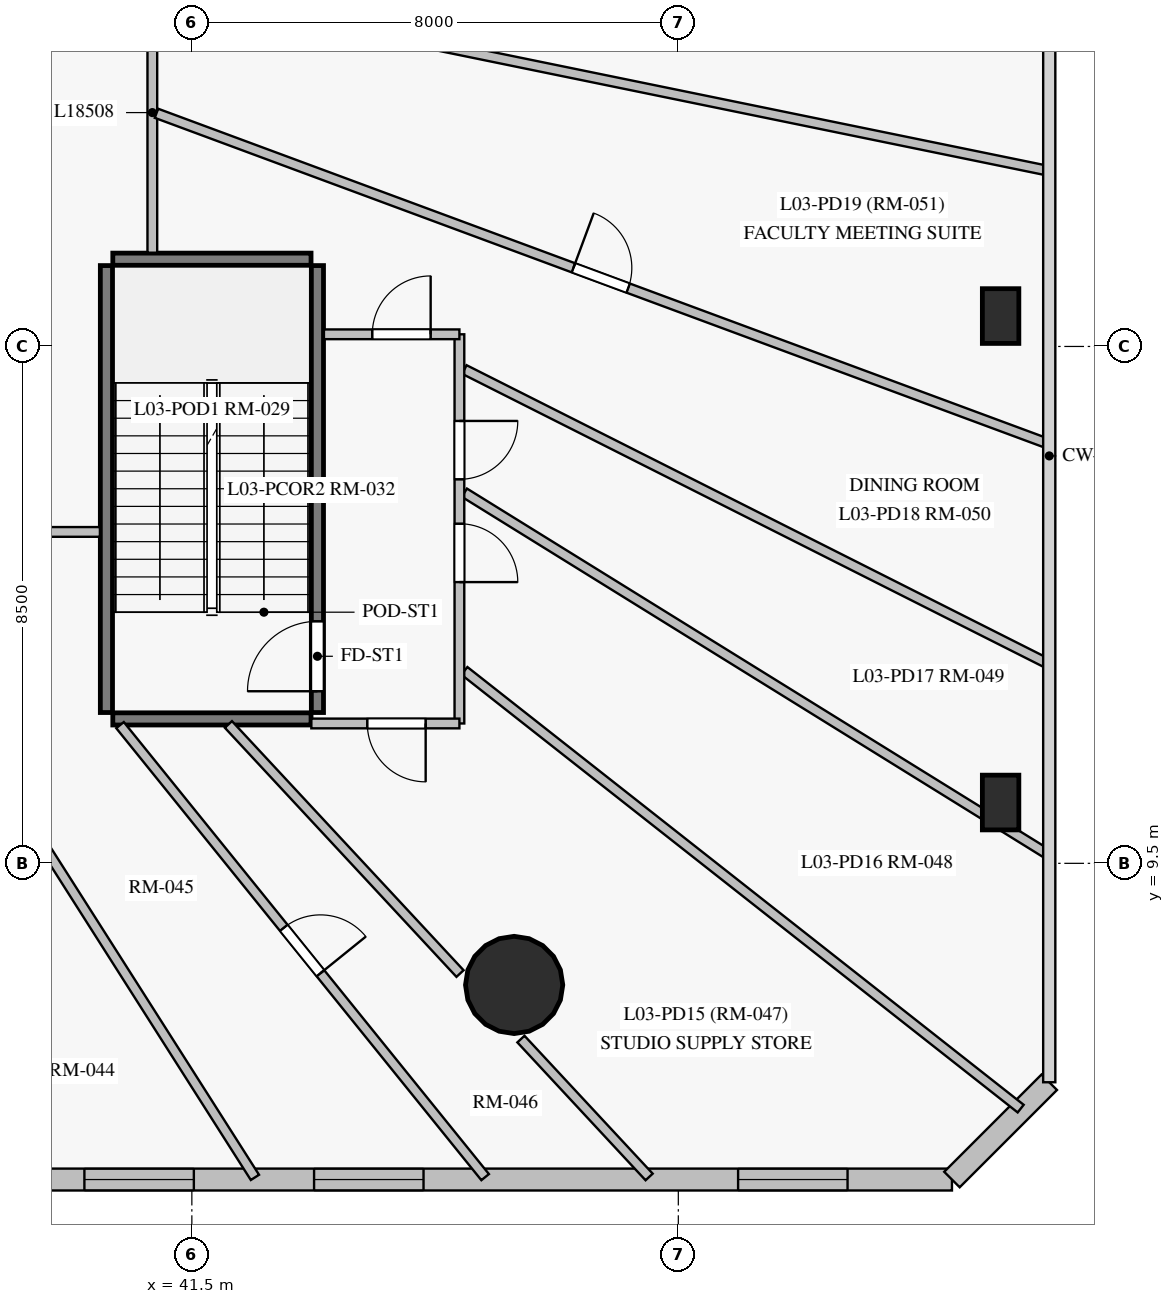
"""IFC4 building model, lengths in metres.
Left out: names, types, materials, properties, quantities, classifications, styles, units other than length and angle.
Written with IfcOpenShell. Run it as: python <this file> out.ifc"""

import sys

from ifc_helpers import new_model, si_unit, direction, frame, frame_2d, origin, origin_with_axes, origin_2d, place, context, subcontext, project, spatial, rectangle, circle, extrude, source, transform, mapped, element, fill, save


model = new_model("IFC4")
c1 = context("Model", 3, precision=1e-05, world=origin(), true_north=direction((0.0, 1.0)))
c2 = subcontext(c1, "Body", "Model", "MODEL_VIEW")
j1 = project(units=[si_unit("LENGTHUNIT", "METRE"), si_unit("PLANEANGLEUNIT", "RADIAN")], contexts=[c1])
p1 = place(None, origin())
s1 = spatial("IfcSite", under=j1, at=p1, CompositionType="ELEMENT")
p2 = place(p1, origin())
s2 = spatial("IfcBuilding", under=s1, at=p2, CompositionType="ELEMENT")
p3 = place(p2, frame((0.0, 0.0, 13.5)))
s3 = spatial("IfcBuildingStorey", under=s2, at=p3, CompositionType="ELEMENT", Elevation=13.5)
m1 = source(origin_with_axes(), c2, "Body", "SweptSolid", [
    extrude(circle(Radius=0.8, at=origin_2d()), origin(), (0.0, 0.0, 1.0), 4.5),
])
p4 = place(p3, frame((46.8, 7.5, 0.0), z_axis=(0.0, 0.0, 1.0), x_axis=(1.0, 0.0, 0.0)))
e1 = element("IfcColumn", 1, at=p4, inside=s3, PredefinedType="COLUMN", context=c2, shape_type="MappedRepresentation", body=[
    mapped(m1, transform((0.0, 0.0, 0.0), scale=1.0)),
])
m2 = source(origin_with_axes(), c2, "Body", "SweptSolid", [
    extrude(rectangle(XDim=0.6, YDim=0.9, at=origin_2d()), origin(), (0.0, 0.0, 1.0), 4.5),
])
for number, where, z_axis, x_axis in (
    (2, (54.8, 10.5, 0.0), (0.0, 0.0, 1.0), (1.0, 0.0, 0.0)),
    (3, (54.8, 18.5, 0.0), (0.0, 0.0, 1.0), (1.0, 0.0, 0.0)),
):
    element("IfcColumn", number, at=place(p3, frame(where, z_axis=z_axis, x_axis=x_axis)), inside=s3, PredefinedType="PILASTER", context=c2, shape_type="MappedRepresentation", body=[
        mapped(m2, transform((0.0, 0.0, 0.0), scale=1.0)),
    ])
p5 = place(p3, frame((7.2, 4.3, 0.0), z_axis=(0.0, 0.0, 1.0), x_axis=(1.0, 0.0, 0.0)))
e4 = element("IfcWall", 4, at=p5, inside=s3, PredefinedType="SOLIDWALL", context=c2, shape_type="SweptSolid", body=[
    extrude(rectangle(XDim=46.8, YDim=0.36, at=frame_2d((23.4, 0.0))), origin(), (0.0, 0.0, 1.0), 4.225),
])
p6 = place(p5, frame((3.305, 0.0, 0.85)))
e5 = element("IfcOpeningElement", 5, at=p6, cuts=e4, PredefinedType="OPENING", context=c2, shape_type="SweptSolid", body=[
    extrude(rectangle(XDim=1.8, YDim=2.2, at=frame_2d((0.9, 1.1))), frame((0.0, 0.19, 0.0), z_axis=(0.0, -1.0, 0.0), x_axis=(1.0, 0.0, 0.0)), (0.0, 0.0, 1.0), 0.38),
])
p7 = place(p5, frame((9.709, 0.0, 0.85)))
e6 = element("IfcOpeningElement", 6, at=p7, cuts=e4, PredefinedType="OPENING", context=c2, shape_type="SweptSolid", body=[
    extrude(rectangle(XDim=1.8, YDim=2.2, at=frame_2d((0.9, 1.1))), frame((0.0, 0.19, 0.0), z_axis=(0.0, -1.0, 0.0), x_axis=(1.0, 0.0, 0.0)), (0.0, 0.0, 1.0), 0.38),
])
p8 = place(p5, frame((15.2, 0.0, 0.85)))
e7 = element("IfcOpeningElement", 7, at=p8, cuts=e4, PredefinedType="OPENING", context=c2, shape_type="SweptSolid", body=[
    extrude(rectangle(XDim=1.8, YDim=2.2, at=frame_2d((0.9, 1.1))), frame((0.0, 0.19, 0.0), z_axis=(0.0, -1.0, 0.0), x_axis=(1.0, 0.0, 0.0)), (0.0, 0.0, 1.0), 0.38),
])
p9 = place(p5, frame((18.865, 0.0, 0.85)))
e8 = element("IfcOpeningElement", 8, at=p9, cuts=e4, PredefinedType="OPENING", context=c2, shape_type="SweptSolid", body=[
    extrude(rectangle(XDim=1.8, YDim=2.2, at=frame_2d((0.9, 1.1))), frame((0.0, 0.19, 0.0), z_axis=(0.0, -1.0, 0.0), x_axis=(1.0, 0.0, 0.0)), (0.0, 0.0, 1.0), 0.38),
])
p10 = place(p5, frame((22.433, 0.0, 0.85)))
e9 = element("IfcOpeningElement", 9, at=p10, cuts=e4, PredefinedType="OPENING", context=c2, shape_type="SweptSolid", body=[
    extrude(rectangle(XDim=1.8, YDim=2.2, at=frame_2d((0.9, 1.1))), frame((0.0, 0.19, 0.0), z_axis=(0.0, -1.0, 0.0), x_axis=(1.0, 0.0, 0.0)), (0.0, 0.0, 1.0), 0.38),
])
p11 = place(p5, frame((28.606, 0.0, 0.85)))
e10 = element("IfcOpeningElement", 10, at=p11, cuts=e4, PredefinedType="OPENING", context=c2, shape_type="SweptSolid", body=[
    extrude(rectangle(XDim=1.8, YDim=2.2, at=frame_2d((0.9, 1.1))), frame((0.0, 0.19, 0.0), z_axis=(0.0, -1.0, 0.0), x_axis=(1.0, 0.0, 0.0)), (0.0, 0.0, 1.0), 0.38),
])
p12 = place(p5, frame((32.533, 0.0, 0.85)))
e11 = element("IfcOpeningElement", 11, at=p12, cuts=e4, PredefinedType="OPENING", context=c2, shape_type="SweptSolid", body=[
    extrude(rectangle(XDim=1.8, YDim=2.2, at=frame_2d((0.9, 1.1))), frame((0.0, 0.19, 0.0), z_axis=(0.0, -1.0, 0.0), x_axis=(1.0, 0.0, 0.0)), (0.0, 0.0, 1.0), 0.38),
])
p13 = place(p5, frame((36.31, 0.0, 0.85)))
e12 = element("IfcOpeningElement", 12, at=p13, cuts=e4, PredefinedType="OPENING", context=c2, shape_type="SweptSolid", body=[
    extrude(rectangle(XDim=1.8, YDim=2.2, at=frame_2d((0.9, 1.1))), frame((0.0, 0.19, 0.0), z_axis=(0.0, -1.0, 0.0), x_axis=(1.0, 0.0, 0.0)), (0.0, 0.0, 1.0), 0.38),
])
p14 = place(p5, frame((43.283, 0.0, 0.85)))
e13 = element("IfcOpeningElement", 13, at=p14, cuts=e4, PredefinedType="OPENING", context=c2, shape_type="SweptSolid", body=[
    extrude(rectangle(XDim=1.8, YDim=2.2, at=frame_2d((0.9, 1.1))), frame((0.0, 0.19, 0.0), z_axis=(0.0, -1.0, 0.0), x_axis=(1.0, 0.0, 0.0)), (0.0, 0.0, 1.0), 0.38),
])
p15 = place(p3, frame((54.0, 4.3, 0.0), z_axis=(0.0, 0.0, 1.0), x_axis=(0.707160727918, 0.707052830339, 0.0)))
e14 = element("IfcWall", 14, at=p15, inside=s3, PredefinedType="SOLIDWALL", context=c2, shape_type="SweptSolid", body=[
    extrude(rectangle(XDim=2.263, YDim=0.36, at=frame_2d((1.131, 0.0))), origin(), (0.0, 0.0, 1.0), 4.225),
])
p16 = place(p3, frame((40.095, 11.98, 0.0), z_axis=(0.0, 0.0, 1.0), x_axis=(0.0, 1.0, 0.0)))
e15 = element("IfcWall", 15, at=p16, inside=s3, PredefinedType="SHEAR", context=c2, shape_type="SweptSolid", body=[
    extrude(rectangle(XDim=7.35, YDim=0.2, at=frame_2d((3.675, 0.0))), origin(), (0.0, 0.0, 1.0), 4.225),
])
p17 = place(p3, frame((43.565, 11.98, 0.0), z_axis=(0.0, 0.0, 1.0), x_axis=(0.0, 1.0, 0.0)))
e16 = element("IfcWall", 16, at=p17, inside=s3, PredefinedType="SHEAR", context=c2, shape_type="SweptSolid", body=[
    extrude(rectangle(XDim=7.35, YDim=0.2, at=frame_2d((3.675, 0.0))), origin(), (0.0, 0.0, 1.0), 4.225),
])
p18 = place(p17, frame((0.35, 0.0, 0.0)))
e17 = element("IfcOpeningElement", 17, at=p18, cuts=e16, PredefinedType="OPENING", context=c2, shape_type="SweptSolid", body=[
    extrude(rectangle(XDim=1.15, YDim=2.15, at=frame_2d((0.575, 1.075))), frame((0.0, 0.11, 0.0), z_axis=(0.0, -1.0, 0.0), x_axis=(1.0, 0.0, 0.0)), (0.0, 0.0, 1.0), 0.22),
])
for number, where, z_axis, x_axis in (
    (18, (40.2, 11.875, 0.0), (0.0, 0.0, 1.0), (1.0, 0.0, 0.0)),
    (19, (40.2, 19.435, 0.0), (0.0, 0.0, 1.0), (1.0, 0.0, 0.0)),
):
    element("IfcWall", number, at=place(p3, frame(where, z_axis=z_axis, x_axis=x_axis)), inside=s3, PredefinedType="SHEAR", context=c2, shape_type="SweptSolid", body=[
        extrude(rectangle(XDim=3.26, YDim=0.2, at=frame_2d((1.63, 0.0))), origin(), (0.0, 0.0, 1.0), 4.225),
    ])
p19 = place(p3, frame((40.85, 38.05, 0.0), z_axis=(0.0, 0.0, 1.0), x_axis=(0.0, -1.0, 0.0)))
e20 = element("IfcWall", 20, at=p19, inside=s3, PredefinedType="PARTITIONING", context=c2, shape_type="SweptSolid", body=[
    extrude(rectangle(XDim=18.508, YDim=0.16, at=frame_2d((9.254, 0.0))), origin(), (0.0, 0.0, 1.0), 3.275),
])
p20 = place(p19, frame((12.94, 0.0, 0.0)))
e21 = element("IfcOpeningElement", 21, at=p20, cuts=e20, PredefinedType="OPENING", context=c2, shape_type="SweptSolid", body=[
    extrude(rectangle(XDim=0.96, YDim=2.15, at=frame_2d((0.48, 1.075))), frame((0.0, 0.09, 0.0), z_axis=(0.0, -1.0, 0.0), x_axis=(1.0, 0.0, 0.0)), (0.0, 0.0, 1.0), 0.18),
])
p21 = place(p19, frame((11.006, 0.0, 0.0)))
e22 = element("IfcOpeningElement", 22, at=p21, cuts=e20, PredefinedType="OPENING", context=c2, shape_type="SweptSolid", body=[
    extrude(rectangle(XDim=0.96, YDim=2.15, at=frame_2d((0.48, 1.075))), frame((0.0, 0.09, 0.0), z_axis=(0.0, -1.0, 0.0), x_axis=(1.0, 0.0, 0.0)), (0.0, 0.0, 1.0), 0.18),
])
p22 = place(p19, frame((8.695, 0.0, 0.0)))
e23 = element("IfcOpeningElement", 23, at=p22, cuts=e20, PredefinedType="OPENING", context=c2, shape_type="SweptSolid", body=[
    extrude(rectangle(XDim=0.96, YDim=2.15, at=frame_2d((0.48, 1.075))), frame((0.0, 0.09, 0.0), z_axis=(0.0, -1.0, 0.0), x_axis=(1.0, 0.0, 0.0)), (0.0, 0.0, 1.0), 0.18),
])
p23 = place(p19, frame((6.434, 0.0, 0.0)))
e24 = element("IfcOpeningElement", 24, at=p23, cuts=e20, PredefinedType="OPENING", context=c2, shape_type="SweptSolid", body=[
    extrude(rectangle(XDim=0.96, YDim=2.15, at=frame_2d((0.48, 1.075))), frame((0.0, 0.09, 0.0), z_axis=(0.0, -1.0, 0.0), x_axis=(1.0, 0.0, 0.0)), (0.0, 0.0, 1.0), 0.18),
])
p24 = place(p19, frame((3.02, 0.0, 0.0)))
e25 = element("IfcOpeningElement", 25, at=p24, cuts=e20, PredefinedType="OPENING", context=c2, shape_type="SweptSolid", body=[
    extrude(rectangle(XDim=0.96, YDim=2.15, at=frame_2d((0.48, 1.075))), frame((0.0, 0.09, 0.0), z_axis=(0.0, -1.0, 0.0), x_axis=(1.0, 0.0, 0.0)), (0.0, 0.0, 1.0), 0.18),
])
p25 = place(p3, frame((40.918, 21.834, 0.0), z_axis=(0.0, 0.0, 1.0), x_axis=(0.937689005533, -0.347475652244, 0.0)))
e26 = element("IfcWall", 26, at=p25, inside=s3, PredefinedType="PARTITIONING", context=c2, shape_type="SweptSolid", body=[
    extrude(rectangle(XDim=15.627, YDim=0.16, at=frame_2d((7.813, 0.0))), origin(), (0.0, 0.0, 1.0), 4.225),
])
p26 = place(p25, frame((7.313, 0.0, 0.0)))
e27 = element("IfcOpeningElement", 27, at=p26, cuts=e26, PredefinedType="OPENING", context=c2, shape_type="SweptSolid", body=[
    extrude(rectangle(XDim=0.96, YDim=2.15, at=frame_2d((0.48, 1.075))), frame((0.0, 0.09, 0.0), z_axis=(0.0, -1.0, 0.0), x_axis=(1.0, 0.0, 0.0)), (0.0, 0.0, 1.0), 0.18),
])
p27 = place(p3, frame((40.932, 23.891, 0.0), z_axis=(0.0, 0.0, 1.0), x_axis=(0.979644974136, -0.200737950197, 0.0)))
e28 = element("IfcWall", 28, at=p27, inside=s3, PredefinedType="PARTITIONING", context=c2, shape_type="SweptSolid", body=[
    extrude(rectangle(XDim=14.946, YDim=0.16, at=frame_2d((7.473, 0.0))), origin(), (0.0, 0.0, 1.0), 3.725),
])
p28 = place(p3, frame((39.988, 14.95, 0.0), z_axis=(0.0, 0.0, 1.0), x_axis=(-1.0, 0.0, 0.0)))
e29 = element("IfcWall", 29, at=p28, inside=s3, PredefinedType="PARTITIONING", context=c2, shape_type="SweptSolid", body=[
    extrude(rectangle(XDim=14.588, YDim=0.16, at=frame_2d((7.294, 0.0))), origin(), (0.0, 0.0, 1.0), 4.225),
])
p29 = place(p28, frame((9.638, 0.0, 0.0)))
e30 = element("IfcOpeningElement", 30, at=p29, cuts=e29, PredefinedType="OPENING", context=c2, shape_type="SweptSolid", body=[
    extrude(rectangle(XDim=0.96, YDim=2.15, at=frame_2d((0.48, 1.075))), frame((0.0, 0.09, 0.0), z_axis=(0.0, -1.0, 0.0), x_axis=(1.0, 0.0, 0.0)), (0.0, 0.0, 1.0), 0.18),
])
p30 = place(p28, frame((6.735, 0.0, 0.0)))
e31 = element("IfcOpeningElement", 31, at=p30, cuts=e29, PredefinedType="OPENING", context=c2, shape_type="SweptSolid", body=[
    extrude(rectangle(XDim=0.96, YDim=2.15, at=frame_2d((0.48, 1.075))), frame((0.0, 0.09, 0.0), z_axis=(0.0, -1.0, 0.0), x_axis=(1.0, 0.0, 0.0)), (0.0, 0.0, 1.0), 0.18),
])
p31 = place(p28, frame((4.572, 0.0, 0.0)))
e32 = element("IfcOpeningElement", 32, at=p31, cuts=e29, PredefinedType="OPENING", context=c2, shape_type="SweptSolid", body=[
    extrude(rectangle(XDim=0.96, YDim=2.15, at=frame_2d((0.48, 1.075))), frame((0.0, 0.09, 0.0), z_axis=(0.0, -1.0, 0.0), x_axis=(1.0, 0.0, 0.0)), (0.0, 0.0, 1.0), 0.18),
])
p32 = place(p28, frame((2.64, 0.0, 0.0)))
e33 = element("IfcOpeningElement", 33, at=p32, cuts=e29, PredefinedType="OPENING", context=c2, shape_type="SweptSolid", body=[
    extrude(rectangle(XDim=0.96, YDim=2.15, at=frame_2d((0.48, 1.075))), frame((0.0, 0.09, 0.0), z_axis=(0.0, -1.0, 0.0), x_axis=(1.0, 0.0, 0.0)), (0.0, 0.0, 1.0), 0.18),
])
p33 = place(p3, frame((35.833, 14.868, 0.0), z_axis=(0.0, 0.0, 1.0), x_axis=(0.536972913637, -0.843599484364, 0.0)))
e34 = element("IfcWall", 34, at=p33, inside=s3, PredefinedType="PARTITIONING", context=c2, shape_type="SweptSolid", body=[
    extrude(rectangle(XDim=12.485, YDim=0.16, at=frame_2d((6.243, 0.0))), origin(), (0.0, 0.0, 1.0), 4.225),
])
p34 = place(p3, frame((45.982, 12.666, 0.0), z_axis=(0.0, 0.0, 1.0), x_axis=(0.785844350615, -0.618424333776, 0.0)))
e35 = element("IfcWall", 35, at=p34, inside=s3, PredefinedType="PARTITIONING", context=c2, shape_type="SweptSolid", body=[
    extrude(rectangle(XDim=11.641, YDim=0.16, at=frame_2d((5.821, 0.0))), origin(), (0.0, 0.0, 1.0), 4.225),
])
p35 = place(p3, frame((45.982, 15.595, 0.0), z_axis=(0.0, 0.0, 1.0), x_axis=(0.849998298484, -0.526785433145, 0.0)))
e36 = element("IfcWall", 36, at=p35, inside=s3, PredefinedType="PARTITIONING", context=c2, shape_type="SweptSolid", body=[
    extrude(rectangle(XDim=11.274, YDim=0.16, at=frame_2d((5.637, 0.0))), origin(), (0.0, 0.0, 1.0), 4.225),
])
p36 = place(p3, frame((45.982, 17.621, 0.0), z_axis=(0.0, 0.0, 1.0), x_axis=(0.892971532671, -0.450113143375, 0.0)))
e37 = element("IfcWall", 37, at=p36, inside=s3, PredefinedType="PARTITIONING", context=c2, shape_type="SweptSolid", body=[
    extrude(rectangle(XDim=10.735, YDim=0.16, at=frame_2d((5.368, 0.0))), origin(), (0.0, 0.0, 1.0), 4.225),
])
p37 = place(p3, frame((40.319, 11.773, 0.0), z_axis=(0.0, 0.0, 1.0), x_axis=(0.628386466177, -0.77790131066, 0.0)))
e38 = element("IfcWall", 38, at=p37, inside=s3, PredefinedType="PARTITIONING", context=c2, shape_type="SweptSolid", body=[
    extrude(rectangle(XDim=9.556, YDim=0.16, at=frame_2d((4.778, 0.0))), origin(), (0.0, 0.0, 1.0), 4.225),
])
p38 = place(p37, frame((4.285, 0.0, 0.0)))
e39 = element("IfcOpeningElement", 39, at=p38, cuts=e38, PredefinedType="OPENING", context=c2, shape_type="SweptSolid", body=[
    extrude(rectangle(XDim=0.96, YDim=2.15, at=frame_2d((0.48, 1.075))), frame((0.0, 0.09, 0.0), z_axis=(0.0, -1.0, 0.0), x_axis=(1.0, 0.0, 0.0)), (0.0, 0.0, 1.0), 0.18),
])
p39 = place(p3, frame((45.9, 18.2, 0.0), z_axis=(0.0, 0.0, 1.0), x_axis=(0.0, -1.0, 0.0)))
e40 = element("IfcWall", 40, at=p39, inside=s3, PredefinedType="PARTITIONING", context=c2, shape_type="SweptSolid", body=[
    extrude(rectangle(XDim=6.4, YDim=0.16, at=frame_2d((3.2, 0.0))), origin(), (0.0, 0.0, 1.0), 4.225),
])
p40 = place(p39, frame((3.115, 0.0, 0.0)))
e41 = element("IfcOpeningElement", 41, at=p40, cuts=e40, PredefinedType="OPENING", context=c2, shape_type="SweptSolid", body=[
    extrude(rectangle(XDim=0.96, YDim=2.15, at=frame_2d((0.48, 1.075))), frame((0.0, 0.09, 0.0), z_axis=(0.0, -1.0, 0.0), x_axis=(1.0, 0.0, 0.0)), (0.0, 0.0, 1.0), 0.18),
])
p41 = place(p39, frame((1.425, 0.0, 0.0)))
e42 = element("IfcOpeningElement", 42, at=p41, cuts=e40, PredefinedType="OPENING", context=c2, shape_type="SweptSolid", body=[
    extrude(rectangle(XDim=0.96, YDim=2.15, at=frame_2d((0.48, 1.075))), frame((0.0, 0.09, 0.0), z_axis=(0.0, -1.0, 0.0), x_axis=(1.0, 0.0, 0.0)), (0.0, 0.0, 1.0), 0.18),
])
p42 = place(p3, frame((42.101, 11.784, 0.0), z_axis=(0.0, 0.0, 1.0), x_axis=(0.680931425019, -0.732347181616, 0.0)))
e43 = element("IfcWall", 43, at=p42, inside=s3, PredefinedType="PARTITIONING", context=c2, shape_type="SweptSolid", body=[
    extrude(rectangle(XDim=5.594, YDim=0.16, at=frame_2d((2.797, 0.0))), origin(), (0.0, 0.0, 1.0), 4.225),
])
p43 = place(p3, frame((46.912, 6.61, 0.0), z_axis=(0.0, 0.0, 1.0), x_axis=(0.680895523886, -0.732380560605, 0.0)))
e44 = element("IfcWall", 44, at=p43, inside=s3, PredefinedType="PARTITIONING", context=c2, shape_type="SweptSolid", body=[
    extrude(rectangle(XDim=3.096, YDim=0.16, at=frame_2d((1.548, 0.0))), origin(), (0.0, 0.0, 1.0), 4.225),
])
p44 = place(p3, frame((45.9, 11.8, 0.0), z_axis=(0.0, 0.0, 1.0), x_axis=(-1.0, 0.0, 0.0)))
e45 = element("IfcWall", 45, at=p44, inside=s3, PredefinedType="PARTITIONING", context=c2, shape_type="SweptSolid", body=[
    extrude(rectangle(XDim=2.435, YDim=0.16, at=frame_2d((1.217, 0.0))), origin(), (0.0, 0.0, 1.0), 4.225),
])
p45 = place(p44, frame((0.555, 0.0, 0.0)))
e46 = element("IfcOpeningElement", 46, at=p45, cuts=e45, PredefinedType="OPENING", context=c2, shape_type="SweptSolid", body=[
    extrude(rectangle(XDim=0.96, YDim=2.15, at=frame_2d((0.48, 1.075))), frame((0.0, 0.09, 0.0), z_axis=(0.0, -1.0, 0.0), x_axis=(1.0, 0.0, 0.0)), (0.0, 0.0, 1.0), 0.18),
])
p46 = place(p3, frame((43.672, 18.2, 0.0), z_axis=(0.0, 0.0, 1.0), x_axis=(1.0, 0.0, 0.0)))
e47 = element("IfcWall", 47, at=p46, inside=s3, PredefinedType="PARTITIONING", context=c2, shape_type="SweptSolid", body=[
    extrude(rectangle(XDim=2.228, YDim=0.16, at=frame_2d((1.114, 0.0))), origin(), (0.0, 0.0, 1.0), 4.225),
])
p47 = place(p46, frame((0.795, 0.0, 0.0)))
e48 = element("IfcOpeningElement", 48, at=p47, cuts=e47, PredefinedType="OPENING", context=c2, shape_type="SweptSolid", body=[
    extrude(rectangle(XDim=0.96, YDim=2.15, at=frame_2d((0.48, 1.075))), frame((0.0, 0.09, 0.0), z_axis=(0.0, -1.0, 0.0), x_axis=(1.0, 0.0, 0.0)), (0.0, 0.0, 1.0), 0.18),
])
m3 = source(origin_with_axes(), c2, "Body", "SweptSolid", [
    extrude(rectangle(XDim=1.8, YDim=2.2, at=frame_2d((0.9, 1.1))), frame((0.0, 0.03, 0.0), z_axis=(0.0, -1.0, 0.0), x_axis=(1.0, 0.0, 0.0)), (0.0, 0.0, 1.0), 0.06),
])
p48 = place(p12, origin())
e49 = element("IfcWindow", 49, at=p48, inside=s3, PartitioningType="SINGLE_PANEL", PredefinedType="WINDOW", context=c2, shape_type="MappedRepresentation", body=[
    mapped(m3, transform((0.0, 0.0, 0.0), scale=1.0)),
])
fill(e11, e49)
p49 = place(p13, origin())
e50 = element("IfcWindow", 50, at=p49, inside=s3, PartitioningType="SINGLE_PANEL", PredefinedType="WINDOW", context=c2, shape_type="MappedRepresentation", body=[
    mapped(m3, transform((0.0, 0.0, 0.0), scale=1.0)),
])
fill(e12, e50)
p50 = place(p14, origin())
e51 = element("IfcWindow", 51, at=p50, inside=s3, PartitioningType="SINGLE_PANEL", PredefinedType="WINDOW", context=c2, shape_type="MappedRepresentation", body=[
    mapped(m3, transform((0.0, 0.0, 0.0), scale=1.0)),
])
fill(e13, e51)
m4 = source(origin_with_axes(), c2, "Body", "SweptSolid", [
    extrude(rectangle(XDim=1.15, YDim=2.15, at=frame_2d((0.575, 1.075))), frame((0.0, 0.025, 0.0), z_axis=(0.0, -1.0, 0.0), x_axis=(1.0, 0.0, 0.0)), (0.0, 0.0, 1.0), 0.05),
])
p51 = place(p18, origin())
e52 = element("IfcDoor", 52, at=p51, inside=s3, OperationType="SINGLE_SWING_LEFT", PredefinedType="DOOR", context=c2, shape_type="MappedRepresentation", body=[
    mapped(m4, transform((0.0, 0.0, 0.0), scale=1.0)),
])
fill(e17, e52)
m5 = source(origin_with_axes(), c2, "Body", "SweptSolid", [
    extrude(rectangle(XDim=0.96, YDim=2.15, at=frame_2d((0.48, 1.075))), frame((0.0, 0.025, 0.0), z_axis=(0.0, -1.0, 0.0), x_axis=(1.0, 0.0, 0.0)), (0.0, 0.0, 1.0), 0.05),
])
p52 = place(p38, origin())
e53 = element("IfcDoor", 53, at=p52, inside=s3, OperationType="SINGLE_SWING_RIGHT", PredefinedType="DOOR", context=c2, shape_type="MappedRepresentation", body=[
    mapped(m5, transform((0.0, 0.0, 0.0), scale=1.0)),
])
fill(e39, e53)
p53 = place(p45, origin())
e54 = element("IfcDoor", 54, at=p53, inside=s3, OperationType="SINGLE_SWING_LEFT", PredefinedType="DOOR", context=c2, shape_type="MappedRepresentation", body=[
    mapped(m5, transform((0.0, 0.0, 0.0), scale=1.0)),
])
fill(e46, e54)
p54 = place(p40, origin())
e55 = element("IfcDoor", 55, at=p54, inside=s3, OperationType="SINGLE_SWING_RIGHT", PredefinedType="DOOR", context=c2, shape_type="MappedRepresentation", body=[
    mapped(m5, transform((0.0, 0.0, 0.0), scale=1.0)),
])
fill(e41, e55)
p55 = place(p41, origin())
e56 = element("IfcDoor", 56, at=p55, inside=s3, OperationType="SINGLE_SWING_LEFT", PredefinedType="DOOR", context=c2, shape_type="MappedRepresentation", body=[
    mapped(m5, transform((0.0, 0.0, 0.0), scale=1.0)),
])
fill(e42, e56)
p56 = place(p47, origin())
e57 = element("IfcDoor", 57, at=p56, inside=s3, OperationType="SINGLE_SWING_RIGHT", PredefinedType="DOOR", context=c2, shape_type="MappedRepresentation", body=[
    mapped(m5, transform((0.0, 0.0, 0.0), scale=1.0)),
])
fill(e48, e57)
p57 = place(p26, origin())
e58 = element("IfcDoor", 58, at=p57, inside=s3, OperationType="SINGLE_SWING_LEFT", PredefinedType="DOOR", context=c2, shape_type="MappedRepresentation", body=[
    mapped(m5, transform((0.0, 0.0, 0.0), scale=1.0)),
])
fill(e27, e58)
save(model, sys.argv[1])
